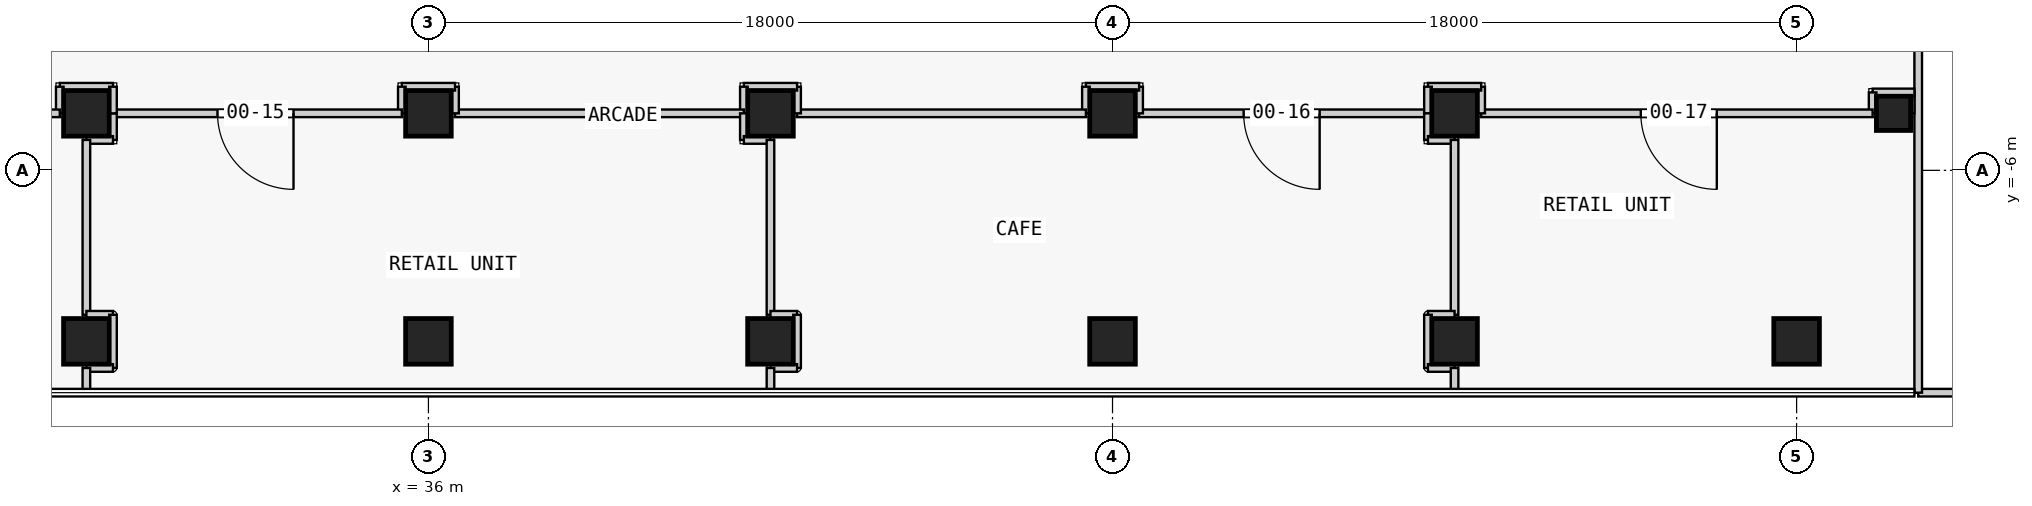
"""IFC4 building model, lengths in metres.
Left out: names, types, materials, properties, quantities, classifications, styles, units other than length and angle.
Written with IfcOpenShell. Run it as: python <this file> out.ifc"""

import sys

from ifc_helpers import new_model, si_unit, direction, frame, frame_2d, origin, origin_2d, place, context, subcontext, project, spatial, rectangle, extrude, element, fill, save


model = new_model("IFC4")
c1 = context("Model", 3, precision=1e-05, world=origin(), true_north=direction((0.0, 1.0)))
c2 = subcontext(c1, "Body", "Model", "MODEL_VIEW")
j1 = project(units=[si_unit("LENGTHUNIT", "METRE"), si_unit("PLANEANGLEUNIT", "RADIAN")], contexts=[c1])
p1 = place(None, origin())
s1 = spatial("IfcSite", under=j1, at=p1, CompositionType="ELEMENT")
p2 = place(p1, origin())
s2 = spatial("IfcBuilding", under=s1, at=p2, CompositionType="ELEMENT")
p3 = place(p2, origin())
s3 = spatial("IfcBuildingStorey", under=s2, at=p3, CompositionType="ELEMENT", Elevation=0.0)
for number, where, z_axis, x_axis in (
    (1, (27.0, -10.5, 0.0), (0.0, 0.0, 1.0), (1.0, 0.0, 0.0)),
    (2, (27.0, -4.5, 0.0), (0.0, 0.0, 1.0), (1.0, 0.0, 0.0)),
    (3, (36.0, -10.5, 0.0), (0.0, 0.0, 1.0), (1.0, 0.0, 0.0)),
    (4, (36.0, -4.5, 0.0), (0.0, 0.0, 1.0), (1.0, 0.0, 0.0)),
    (5, (45.0, -10.5, 0.0), (0.0, 0.0, 1.0), (1.0, 0.0, 0.0)),
    (6, (45.0, -4.5, 0.0), (0.0, 0.0, 1.0), (1.0, 0.0, 0.0)),
    (7, (54.0, -10.5, 0.0), (0.0, 0.0, 1.0), (1.0, 0.0, 0.0)),
    (8, (54.0, -4.5, 0.0), (0.0, 0.0, 1.0), (1.0, 0.0, 0.0)),
    (9, (63.0, -10.5, 0.0), (0.0, 0.0, 1.0), (1.0, 0.0, 0.0)),
    (10, (63.0, -4.5, 0.0), (0.0, 0.0, 1.0), (1.0, 0.0, 0.0)),
    (11, (72.0, -10.5, 0.0), (0.0, 0.0, 1.0), (1.0, 0.0, 0.0)),
):
    element("IfcColumn", number, at=place(p3, frame(where, z_axis=z_axis, x_axis=x_axis)), inside=s3, PredefinedType="COLUMN", context=c2, shape_type="SweptSolid", body=[
        extrude(rectangle(XDim=1.2, YDim=1.2, at=origin_2d()), origin(), (0.0, 0.0, 1.0), 8.0),
    ])
p4 = place(p3, frame((74.55, -4.5, 0.0), z_axis=(0.0, 0.0, 1.0), x_axis=(1.0, 0.0, 0.0)))
e12 = element("IfcColumn", 12, at=p4, inside=s3, PredefinedType="COLUMN", context=c2, shape_type="SweptSolid", body=[
    extrude(rectangle(XDim=0.9, YDim=0.9, at=origin_2d()), origin(), (0.0, 0.0, 1.0), 8.0),
])
p5 = place(p3, frame((75.2, -11.85, 0.0), z_axis=(0.0, 0.0, 1.0), x_axis=(0.0, 1.0, 0.0)))
e13 = element("IfcWall", 13, at=p5, inside=s3, PredefinedType="PARTITIONING", context=c2, shape_type="SweptSolid", body=[
    extrude(rectangle(XDim=11.85, YDim=0.2, at=frame_2d((5.925, 0.0))), origin(), (0.0, 0.0, 1.0), 7.65),
])
p6 = place(p3, frame((75.2, -11.85, 0.0), z_axis=(0.0, 0.0, 1.0), x_axis=(1.0, 0.0, 0.0)))
e14 = element("IfcWall", 14, at=p6, inside=s3, PredefinedType="PARTITIONING", context=c2, shape_type="SweptSolid", body=[
    extrude(rectangle(XDim=2.4, YDim=0.2, at=frame_2d((1.2, 0.0))), origin(), (0.0, 0.0, 1.0), 7.65),
])
p7 = place(p3, frame((27.7, -3.8, 0.0), z_axis=(0.0, 0.0, 1.0), x_axis=(-1.0, 0.0, 0.0)))
e15 = element("IfcWall", 15, at=p7, inside=s3, PredefinedType="PARTITIONING", context=c2, shape_type="SweptSolid", body=[
    extrude(rectangle(XDim=1.4, YDim=0.2, at=frame_2d((0.7, 0.0))), origin(), (0.0, 0.0, 1.0), 6.95),
])
p8 = place(p3, frame((26.3, -3.8, 0.0), z_axis=(0.0, 0.0, 1.0), x_axis=(0.0, -1.0, 0.0)))
e16 = element("IfcWall", 16, at=p8, inside=s3, PredefinedType="PARTITIONING", context=c2, shape_type="SweptSolid", body=[
    extrude(rectangle(XDim=0.7, YDim=0.2, at=frame_2d((0.35, 0.0))), origin(), (0.0, 0.0, 1.0), 6.95),
])
p9 = place(p3, frame((26.3, -4.5, 0.0), z_axis=(0.0, 0.0, 1.0), x_axis=(-1.0, 0.0, 0.0)))
e17 = element("IfcWall", 17, at=p9, inside=s3, PredefinedType="PARTITIONING", context=c2, shape_type="SweptSolid", body=[
    extrude(rectangle(XDim=7.6, YDim=0.2, at=frame_2d((3.8, 0.0))), origin(), (0.0, 0.0, 1.0), 6.95),
])
p10 = place(p9, frame((2.85, 0.0, 0.0)))
e18 = element("IfcOpeningElement", 18, at=p10, cuts=e17, PredefinedType="OPENING", context=c2, shape_type="SweptSolid", body=[
    extrude(rectangle(XDim=2.0, YDim=2.4, at=frame_2d((1.0, 1.2))), frame((0.0, 0.11, 0.0), z_axis=(0.0, -1.0, 0.0), x_axis=(1.0, 0.0, 0.0)), (0.0, 0.0, 1.0), 0.22),
])
p11 = place(p3, frame((62.3, -4.5, 0.0), z_axis=(0.0, 0.0, 1.0), x_axis=(-1.0, 0.0, 0.0)))
e19 = element("IfcWall", 19, at=p11, inside=s3, PredefinedType="PARTITIONING", context=c2, shape_type="SweptSolid", body=[
    extrude(rectangle(XDim=7.6, YDim=0.2, at=frame_2d((3.8, 0.0))), origin(), (0.0, 0.0, 1.0), 6.95),
])
p12 = place(p11, frame((2.85, 0.0, 0.0)))
e20 = element("IfcOpeningElement", 20, at=p12, cuts=e19, PredefinedType="OPENING", context=c2, shape_type="SweptSolid", body=[
    extrude(rectangle(XDim=2.0, YDim=2.4, at=frame_2d((1.0, 1.2))), frame((0.0, 0.11, 0.0), z_axis=(0.0, -1.0, 0.0), x_axis=(1.0, 0.0, 0.0)), (0.0, 0.0, 1.0), 0.22),
])
p13 = place(p3, frame((54.7, -4.5, 0.0), z_axis=(0.0, 0.0, 1.0), x_axis=(0.0, 1.0, 0.0)))
e21 = element("IfcWall", 21, at=p13, inside=s3, PredefinedType="PARTITIONING", context=c2, shape_type="SweptSolid", body=[
    extrude(rectangle(XDim=0.7, YDim=0.2, at=frame_2d((0.35, 0.0))), origin(), (0.0, 0.0, 1.0), 6.95),
])
p14 = place(p3, frame((54.7, -3.8, 0.0), z_axis=(0.0, 0.0, 1.0), x_axis=(-1.0, 0.0, 0.0)))
e22 = element("IfcWall", 22, at=p14, inside=s3, PredefinedType="PARTITIONING", context=c2, shape_type="SweptSolid", body=[
    extrude(rectangle(XDim=1.4, YDim=0.2, at=frame_2d((0.7, 0.0))), origin(), (0.0, 0.0, 1.0), 6.95),
])
p15 = place(p3, frame((53.3, -3.8, 0.0), z_axis=(0.0, 0.0, 1.0), x_axis=(0.0, -1.0, 0.0)))
e23 = element("IfcWall", 23, at=p15, inside=s3, PredefinedType="PARTITIONING", context=c2, shape_type="SweptSolid", body=[
    extrude(rectangle(XDim=0.7, YDim=0.2, at=frame_2d((0.35, 0.0))), origin(), (0.0, 0.0, 1.0), 6.95),
])
p16 = place(p3, frame((53.3, -4.5, 0.0), z_axis=(0.0, 0.0, 1.0), x_axis=(-1.0, 0.0, 0.0)))
e24 = element("IfcWall", 24, at=p16, inside=s3, PredefinedType="PARTITIONING", context=c2, shape_type="SweptSolid", body=[
    extrude(rectangle(XDim=7.6, YDim=0.2, at=frame_2d((3.8, 0.0))), origin(), (0.0, 0.0, 1.0), 6.95),
])
p17 = place(p3, frame((45.7, -4.5, 0.0), z_axis=(0.0, 0.0, 1.0), x_axis=(0.0, 1.0, 0.0)))
e25 = element("IfcWall", 25, at=p17, inside=s3, PredefinedType="PARTITIONING", context=c2, shape_type="SweptSolid", body=[
    extrude(rectangle(XDim=0.7, YDim=0.2, at=frame_2d((0.35, 0.0))), origin(), (0.0, 0.0, 1.0), 6.95),
])
p18 = place(p3, frame((45.7, -3.8, 0.0), z_axis=(0.0, 0.0, 1.0), x_axis=(-1.0, 0.0, 0.0)))
e26 = element("IfcWall", 26, at=p18, inside=s3, PredefinedType="PARTITIONING", context=c2, shape_type="SweptSolid", body=[
    extrude(rectangle(XDim=1.4, YDim=0.2, at=frame_2d((0.7, 0.0))), origin(), (0.0, 0.0, 1.0), 6.95),
])
p19 = place(p3, frame((44.3, -3.8, 0.0), z_axis=(0.0, 0.0, 1.0), x_axis=(0.0, -1.0, 0.0)))
e27 = element("IfcWall", 27, at=p19, inside=s3, PredefinedType="PARTITIONING", context=c2, shape_type="SweptSolid", body=[
    extrude(rectangle(XDim=0.7, YDim=0.2, at=frame_2d((0.35, 0.0))), origin(), (0.0, 0.0, 1.0), 6.95),
])
p20 = place(p3, frame((44.3, -4.5, 0.0), z_axis=(0.0, 0.0, 1.0), x_axis=(-1.0, 0.0, 0.0)))
e28 = element("IfcWall", 28, at=p20, inside=s3, PredefinedType="PARTITIONING", context=c2, shape_type="SweptSolid", body=[
    extrude(rectangle(XDim=7.6, YDim=0.2, at=frame_2d((3.8, 0.0))), origin(), (0.0, 0.0, 1.0), 6.95),
])
p21 = place(p3, frame((36.7, -4.5, 0.0), z_axis=(0.0, 0.0, 1.0), x_axis=(0.0, 1.0, 0.0)))
e29 = element("IfcWall", 29, at=p21, inside=s3, PredefinedType="PARTITIONING", context=c2, shape_type="SweptSolid", body=[
    extrude(rectangle(XDim=0.7, YDim=0.2, at=frame_2d((0.35, 0.0))), origin(), (0.0, 0.0, 1.0), 6.95),
])
p22 = place(p3, frame((36.7, -3.8, 0.0), z_axis=(0.0, 0.0, 1.0), x_axis=(-1.0, 0.0, 0.0)))
e30 = element("IfcWall", 30, at=p22, inside=s3, PredefinedType="PARTITIONING", context=c2, shape_type="SweptSolid", body=[
    extrude(rectangle(XDim=1.4, YDim=0.2, at=frame_2d((0.7, 0.0))), origin(), (0.0, 0.0, 1.0), 6.95),
])
p23 = place(p3, frame((35.3, -3.8, 0.0), z_axis=(0.0, 0.0, 1.0), x_axis=(0.0, -1.0, 0.0)))
e31 = element("IfcWall", 31, at=p23, inside=s3, PredefinedType="PARTITIONING", context=c2, shape_type="SweptSolid", body=[
    extrude(rectangle(XDim=0.7, YDim=0.2, at=frame_2d((0.35, 0.0))), origin(), (0.0, 0.0, 1.0), 6.95),
])
p24 = place(p3, frame((35.3, -4.5, 0.0), z_axis=(0.0, 0.0, 1.0), x_axis=(-1.0, 0.0, 0.0)))
e32 = element("IfcWall", 32, at=p24, inside=s3, PredefinedType="PARTITIONING", context=c2, shape_type="SweptSolid", body=[
    extrude(rectangle(XDim=7.6, YDim=0.2, at=frame_2d((3.8, 0.0))), origin(), (0.0, 0.0, 1.0), 6.95),
])
p25 = place(p24, frame((2.85, 0.0, 0.0)))
e33 = element("IfcOpeningElement", 33, at=p25, cuts=e32, PredefinedType="OPENING", context=c2, shape_type="SweptSolid", body=[
    extrude(rectangle(XDim=2.0, YDim=2.4, at=frame_2d((1.0, 1.2))), frame((0.0, 0.11, 0.0), z_axis=(0.0, -1.0, 0.0), x_axis=(1.0, 0.0, 0.0)), (0.0, 0.0, 1.0), 0.22),
])
p26 = place(p3, frame((75.0, -4.5, 0.0), z_axis=(0.0, 0.0, 1.0), x_axis=(0.0, 1.0, 0.0)))
e34 = element("IfcWall", 34, at=p26, inside=s3, PredefinedType="PARTITIONING", context=c2, shape_type="SweptSolid", body=[
    extrude(rectangle(XDim=0.55, YDim=0.2, at=frame_2d((0.275, 0.0))), origin(), (0.0, 0.0, 1.0), 7.65),
])
p27 = place(p3, frame((75.1, -3.95, 0.0), z_axis=(0.0, 0.0, 1.0), x_axis=(-1.0, 0.0, 0.0)))
e35 = element("IfcWall", 35, at=p27, inside=s3, PredefinedType="PARTITIONING", context=c2, shape_type="SweptSolid", body=[
    extrude(rectangle(XDim=1.1, YDim=0.2, at=frame_2d((0.55, 0.0))), origin(), (0.0, 0.0, 1.0), 7.65),
])
p28 = place(p3, frame((74.0, -3.95, 0.0), z_axis=(0.0, 0.0, 1.0), x_axis=(0.0, -1.0, 0.0)))
e36 = element("IfcWall", 36, at=p28, inside=s3, PredefinedType="PARTITIONING", context=c2, shape_type="SweptSolid", body=[
    extrude(rectangle(XDim=0.55, YDim=0.2, at=frame_2d((0.275, 0.0))), origin(), (0.0, 0.0, 1.0), 7.65),
])
p29 = place(p3, frame((74.0, -4.5, 0.0), z_axis=(0.0, 0.0, 1.0), x_axis=(-1.0, 0.0, 0.0)))
e37 = element("IfcWall", 37, at=p29, inside=s3, PredefinedType="PARTITIONING", context=c2, shape_type="SweptSolid", body=[
    extrude(rectangle(XDim=10.3, YDim=0.2, at=frame_2d((5.15, 0.0))), origin(), (0.0, 0.0, 1.0), 7.65),
])
p30 = place(p29, frame((4.1, 0.0, 0.0)))
e38 = element("IfcOpeningElement", 38, at=p30, cuts=e37, PredefinedType="OPENING", context=c2, shape_type="SweptSolid", body=[
    extrude(rectangle(XDim=2.0, YDim=2.4, at=frame_2d((1.0, 1.2))), frame((0.0, 0.11, 0.0), z_axis=(0.0, -1.0, 0.0), x_axis=(1.0, 0.0, 0.0)), (0.0, 0.0, 1.0), 0.22),
])
p31 = place(p3, frame((63.7, -4.5, 0.0), z_axis=(0.0, 0.0, 1.0), x_axis=(0.0, 1.0, 0.0)))
e39 = element("IfcWall", 39, at=p31, inside=s3, PredefinedType="PARTITIONING", context=c2, shape_type="SweptSolid", body=[
    extrude(rectangle(XDim=0.7, YDim=0.2, at=frame_2d((0.35, 0.0))), origin(), (0.0, 0.0, 1.0), 7.65),
])
p32 = place(p3, frame((63.7, -3.8, 0.0), z_axis=(0.0, 0.0, 1.0), x_axis=(-1.0, 0.0, 0.0)))
e40 = element("IfcWall", 40, at=p32, inside=s3, PredefinedType="PARTITIONING", context=c2, shape_type="SweptSolid", body=[
    extrude(rectangle(XDim=1.4, YDim=0.2, at=frame_2d((0.7, 0.0))), origin(), (0.0, 0.0, 1.0), 6.95),
])
for number, where, z_axis, x_axis in (
    (41, (62.3, -3.8, 0.0), (0.0, 0.0, 1.0), (0.0, -1.0, 0.0)),
    (42, (62.3, -4.5, 0.0), (0.0, 0.0, 1.0), (0.0, -1.0, 0.0)),
    (43, (62.3, -5.2, 0.0), (0.0, 0.0, 1.0), (1.0, 0.0, 0.0)),
):
    element("IfcWall", number, at=place(p3, frame(where, z_axis=z_axis, x_axis=x_axis)), inside=s3, PredefinedType="PARTITIONING", context=c2, shape_type="SweptSolid", body=[
        extrude(rectangle(XDim=0.7, YDim=0.2, at=frame_2d((0.35, 0.0))), origin(), (0.0, 0.0, 1.0), 6.95),
    ])
p33 = place(p3, frame((63.0, -5.2, 0.0), z_axis=(0.0, 0.0, 1.0), x_axis=(0.0, -1.0, 0.0)))
e44 = element("IfcWall", 44, at=p33, inside=s3, PredefinedType="PARTITIONING", context=c2, shape_type="SweptSolid", body=[
    extrude(rectangle(XDim=4.6, YDim=0.2, at=frame_2d((2.3, 0.0))), origin(), (0.0, 0.0, 1.0), 6.95),
])
p34 = place(p3, frame((63.0, -9.8, 0.0), z_axis=(0.0, 0.0, 1.0), x_axis=(-1.0, 0.0, 0.0)))
e45 = element("IfcWall", 45, at=p34, inside=s3, PredefinedType="PARTITIONING", context=c2, shape_type="SweptSolid", body=[
    extrude(rectangle(XDim=0.7, YDim=0.2, at=frame_2d((0.35, 0.0))), origin(), (0.0, 0.0, 1.0), 6.95),
])
p35 = place(p3, frame((62.3, -9.8, 0.0), z_axis=(0.0, 0.0, 1.0), x_axis=(0.0, -1.0, 0.0)))
e46 = element("IfcWall", 46, at=p35, inside=s3, PredefinedType="PARTITIONING", context=c2, shape_type="SweptSolid", body=[
    extrude(rectangle(XDim=1.4, YDim=0.2, at=frame_2d((0.7, 0.0))), origin(), (0.0, 0.0, 1.0), 6.95),
])
p36 = place(p3, frame((62.3, -11.2, 0.0), z_axis=(0.0, 0.0, 1.0), x_axis=(1.0, 0.0, 0.0)))
e47 = element("IfcWall", 47, at=p36, inside=s3, PredefinedType="PARTITIONING", context=c2, shape_type="SweptSolid", body=[
    extrude(rectangle(XDim=0.7, YDim=0.2, at=frame_2d((0.35, 0.0))), origin(), (0.0, 0.0, 1.0), 7.65),
])
p37 = place(p3, frame((63.0, -11.2, 0.0), z_axis=(0.0, 0.0, 1.0), x_axis=(0.0, -1.0, 0.0)))
e48 = element("IfcWall", 48, at=p37, inside=s3, PredefinedType="PARTITIONING", context=c2, shape_type="SweptSolid", body=[
    extrude(rectangle(XDim=0.65, YDim=0.2, at=frame_2d((0.325, 0.0))), origin(), (0.0, 0.0, 1.0), 7.65),
])
for number, where, z_axis, x_axis in (
    (49, (44.3, -4.5, 0.0), (0.0, 0.0, 1.0), (0.0, -1.0, 0.0)),
    (50, (44.3, -5.2, 0.0), (0.0, 0.0, 1.0), (1.0, 0.0, 0.0)),
):
    element("IfcWall", number, at=place(p3, frame(where, z_axis=z_axis, x_axis=x_axis)), inside=s3, PredefinedType="PARTITIONING", context=c2, shape_type="SweptSolid", body=[
        extrude(rectangle(XDim=0.7, YDim=0.2, at=frame_2d((0.35, 0.0))), origin(), (0.0, 0.0, 1.0), 6.95),
    ])
p38 = place(p3, frame((45.0, -5.2, 0.0), z_axis=(0.0, 0.0, 1.0), x_axis=(0.0, -1.0, 0.0)))
e51 = element("IfcWall", 51, at=p38, inside=s3, PredefinedType="PARTITIONING", context=c2, shape_type="SweptSolid", body=[
    extrude(rectangle(XDim=4.6, YDim=0.2, at=frame_2d((2.3, 0.0))), origin(), (0.0, 0.0, 1.0), 6.95),
])
p39 = place(p3, frame((45.0, -9.8, 0.0), z_axis=(0.0, 0.0, 1.0), x_axis=(1.0, 0.0, 0.0)))
e52 = element("IfcWall", 52, at=p39, inside=s3, PredefinedType="PARTITIONING", context=c2, shape_type="SweptSolid", body=[
    extrude(rectangle(XDim=0.7, YDim=0.2, at=frame_2d((0.35, 0.0))), origin(), (0.0, 0.0, 1.0), 6.95),
])
p40 = place(p3, frame((45.7, -9.8, 0.0), z_axis=(0.0, 0.0, 1.0), x_axis=(0.0, -1.0, 0.0)))
e53 = element("IfcWall", 53, at=p40, inside=s3, PredefinedType="PARTITIONING", context=c2, shape_type="SweptSolid", body=[
    extrude(rectangle(XDim=1.4, YDim=0.2, at=frame_2d((0.7, 0.0))), origin(), (0.0, 0.0, 1.0), 6.95),
])
p41 = place(p3, frame((45.7, -11.2, 0.0), z_axis=(0.0, 0.0, 1.0), x_axis=(-1.0, 0.0, 0.0)))
e54 = element("IfcWall", 54, at=p41, inside=s3, PredefinedType="PARTITIONING", context=c2, shape_type="SweptSolid", body=[
    extrude(rectangle(XDim=0.7, YDim=0.2, at=frame_2d((0.35, 0.0))), origin(), (0.0, 0.0, 1.0), 7.65),
])
p42 = place(p3, frame((45.0, -11.2, 0.0), z_axis=(0.0, 0.0, 1.0), x_axis=(0.0, -1.0, 0.0)))
e55 = element("IfcWall", 55, at=p42, inside=s3, PredefinedType="PARTITIONING", context=c2, shape_type="SweptSolid", body=[
    extrude(rectangle(XDim=0.65, YDim=0.2, at=frame_2d((0.325, 0.0))), origin(), (0.0, 0.0, 1.0), 7.65),
])
for number, where, z_axis, x_axis in (
    (56, (27.7, -4.5, 0.0), (0.0, 0.0, 1.0), (0.0, -1.0, 0.0)),
    (57, (27.7, -5.2, 0.0), (0.0, 0.0, 1.0), (-1.0, 0.0, 0.0)),
):
    element("IfcWall", number, at=place(p3, frame(where, z_axis=z_axis, x_axis=x_axis)), inside=s3, PredefinedType="PARTITIONING", context=c2, shape_type="SweptSolid", body=[
        extrude(rectangle(XDim=0.7, YDim=0.2, at=frame_2d((0.35, 0.0))), origin(), (0.0, 0.0, 1.0), 6.95),
    ])
p43 = place(p3, frame((27.0, -5.2, 0.0), z_axis=(0.0, 0.0, 1.0), x_axis=(0.0, -1.0, 0.0)))
e58 = element("IfcWall", 58, at=p43, inside=s3, PredefinedType="PARTITIONING", context=c2, shape_type="SweptSolid", body=[
    extrude(rectangle(XDim=4.6, YDim=0.2, at=frame_2d((2.3, 0.0))), origin(), (0.0, 0.0, 1.0), 6.95),
])
p44 = place(p3, frame((27.0, -9.8, 0.0), z_axis=(0.0, 0.0, 1.0), x_axis=(1.0, 0.0, 0.0)))
e59 = element("IfcWall", 59, at=p44, inside=s3, PredefinedType="PARTITIONING", context=c2, shape_type="SweptSolid", body=[
    extrude(rectangle(XDim=0.7, YDim=0.2, at=frame_2d((0.35, 0.0))), origin(), (0.0, 0.0, 1.0), 6.95),
])
p45 = place(p3, frame((27.7, -9.8, 0.0), z_axis=(0.0, 0.0, 1.0), x_axis=(0.0, -1.0, 0.0)))
e60 = element("IfcWall", 60, at=p45, inside=s3, PredefinedType="PARTITIONING", context=c2, shape_type="SweptSolid", body=[
    extrude(rectangle(XDim=1.4, YDim=0.2, at=frame_2d((0.7, 0.0))), origin(), (0.0, 0.0, 1.0), 6.95),
])
p46 = place(p3, frame((27.7, -11.2, 0.0), z_axis=(0.0, 0.0, 1.0), x_axis=(-1.0, 0.0, 0.0)))
e61 = element("IfcWall", 61, at=p46, inside=s3, PredefinedType="PARTITIONING", context=c2, shape_type="SweptSolid", body=[
    extrude(rectangle(XDim=0.7, YDim=0.2, at=frame_2d((0.35, 0.0))), origin(), (0.0, 0.0, 1.0), 7.65),
])
p47 = place(p3, frame((27.0, -11.2, 0.0), z_axis=(0.0, 0.0, 1.0), x_axis=(0.0, -1.0, 0.0)))
e62 = element("IfcWall", 62, at=p47, inside=s3, PredefinedType="PARTITIONING", context=c2, shape_type="SweptSolid", body=[
    extrude(rectangle(XDim=0.65, YDim=0.2, at=frame_2d((0.325, 0.0))), origin(), (0.0, 0.0, 1.0), 7.65),
])
p48 = place(p3, frame((27.7, -4.5, 0.0), z_axis=(0.0, 0.0, 1.0), x_axis=(0.0, 1.0, 0.0)))
e63 = element("IfcWall", 63, at=p48, inside=s3, PredefinedType="PARTITIONING", context=c2, shape_type="SweptSolid", body=[
    extrude(rectangle(XDim=0.7, YDim=0.2, at=frame_2d((0.35, 0.0))), origin(), (0.0, 0.0, 1.0), 6.95),
])
p49 = place(p25, origin())
e64 = element("IfcDoor", 64, at=p49, inside=s3, OperationType="SINGLE_SWING_LEFT", PredefinedType="DOOR", context=c2, shape_type="SweptSolid", body=[
    extrude(rectangle(XDim=2.0, YDim=2.4, at=frame_2d((1.0, 1.2))), frame((0.0, 0.025, 0.0), z_axis=(0.0, -1.0, 0.0), x_axis=(1.0, 0.0, 0.0)), (0.0, 0.0, 1.0), 0.05),
])
fill(e33, e64)
p50 = place(p12, origin())
e65 = element("IfcDoor", 65, at=p50, inside=s3, OperationType="SINGLE_SWING_LEFT", PredefinedType="DOOR", context=c2, shape_type="SweptSolid", body=[
    extrude(rectangle(XDim=2.0, YDim=2.4, at=frame_2d((1.0, 1.2))), frame((0.0, 0.025, 0.0), z_axis=(0.0, -1.0, 0.0), x_axis=(1.0, 0.0, 0.0)), (0.0, 0.0, 1.0), 0.05),
])
fill(e20, e65)
p51 = place(p30, origin())
e66 = element("IfcDoor", 66, at=p51, inside=s3, OperationType="SINGLE_SWING_LEFT", PredefinedType="DOOR", context=c2, shape_type="SweptSolid", body=[
    extrude(rectangle(XDim=2.0, YDim=2.4, at=frame_2d((1.0, 1.2))), frame((0.0, 0.025, 0.0), z_axis=(0.0, -1.0, 0.0), x_axis=(1.0, 0.0, 0.0)), (0.0, 0.0, 1.0), 0.05),
])
fill(e38, e66)
save(model, sys.argv[1])
